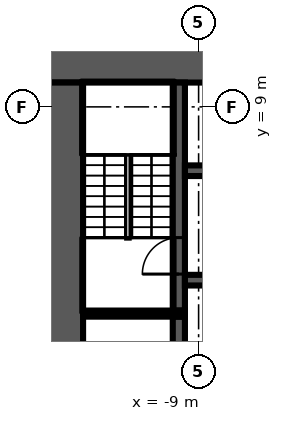
"""IFC4 building model, lengths in metres.
Left out: names, types, materials, properties, quantities, classifications, styles, units other than length and angle.
Written with IfcOpenShell. Run it as: python <this file> out.ifc"""

import sys

from ifc_helpers import new_model, si_unit, direction, frame, frame_2d, origin, place, context, subcontext, project, spatial, rectangle, extrude, element, fill, save


model = new_model("IFC4")
c1 = context("Model", 3, precision=1e-05, world=origin(), true_north=direction((0.0, 1.0)))
c2 = subcontext(c1, "Body", "Model", "MODEL_VIEW")
j1 = project(units=[si_unit("LENGTHUNIT", "METRE"), si_unit("PLANEANGLEUNIT", "RADIAN")], contexts=[c1])
p1 = place(None, origin())
s1 = spatial("IfcSite", under=j1, at=p1, CompositionType="ELEMENT")
p2 = place(p1, origin())
s2 = spatial("IfcBuilding", under=s1, at=p2, CompositionType="ELEMENT")
p3 = place(p2, frame((0.0, 0.0, 27.0)))
s3 = spatial("IfcBuildingStorey", under=s2, at=p3, CompositionType="ELEMENT", Elevation=27.0)
p4 = place(p3, frame((-14.0, 10.4, 0.0), z_axis=(0.0, 0.0, 1.0), x_axis=(1.0, 0.0, 0.0)))
e1 = element("IfcWall", 1, at=p4, inside=s3, PredefinedType="SHEAR", context=c2, shape_type="SweptSolid", body=[
    extrude(rectangle(XDim=28.0, YDim=1.2, at=frame_2d((14.0, 0.0))), origin(), (0.0, 0.0, 1.0), 5.55),
])
p5 = place(p4, frame((15.9, 0.0, 0.0)))
e2 = element("IfcOpeningElement", 2, at=p5, cuts=e1, PredefinedType="OPENING", context=c2, shape_type="SweptSolid", body=[
    extrude(rectangle(XDim=1.6, YDim=2.1, at=frame_2d((0.8, 1.05))), frame((0.0, 0.61, 0.0), z_axis=(0.0, -1.0, 0.0), x_axis=(1.0, 0.0, 0.0)), (0.0, 0.0, 1.0), 1.22),
])
p6 = place(p3, frame((-13.4, -9.8, 0.0), z_axis=(0.0, 0.0, 1.0), x_axis=(0.0, 1.0, 0.0)))
e3 = element("IfcWall", 3, at=p6, inside=s3, PredefinedType="SHEAR", context=c2, shape_type="SweptSolid", body=[
    extrude(rectangle(XDim=19.6, YDim=1.2, at=frame_2d((9.8, 0.0))), origin(), (0.0, 0.0, 1.0), 5.55),
])
p7 = place(p3, frame((-9.65, -2.1, 0.0), z_axis=(0.0, 0.0, 1.0), x_axis=(0.0, 1.0, 0.0)))
e4 = element("IfcWall", 4, at=p7, inside=s3, PredefinedType="SHEAR", context=c2, shape_type="SweptSolid", body=[
    extrude(rectangle(XDim=4.2, YDim=0.4, at=frame_2d((2.1, 0.0))), origin(), (0.0, 0.0, 1.0), 5.55),
])
p8 = place(p3, frame((-9.65, 2.3, 0.0), z_axis=(0.0, 0.0, 1.0), x_axis=(0.0, 1.0, 0.0)))
e5 = element("IfcWall", 5, at=p8, inside=s3, PredefinedType="SHEAR", context=c2, shape_type="SweptSolid", body=[
    extrude(rectangle(XDim=7.5, YDim=0.4, at=frame_2d((3.75, 0.0))), origin(), (0.0, 0.0, 1.0), 5.55),
])
p9 = place(p8, frame((1.2, 0.0, 0.0)))
e6 = element("IfcOpeningElement", 6, at=p9, cuts=e5, PredefinedType="OPENING", context=c2, shape_type="SweptSolid", body=[
    extrude(rectangle(XDim=1.2, YDim=2.1, at=frame_2d((0.6, 1.05))), frame((0.0, 0.21, 0.0), z_axis=(0.0, -1.0, 0.0), x_axis=(1.0, 0.0, 0.0)), (0.0, 0.0, 1.0), 0.42),
])
p10 = place(p3, frame((-9.45, 2.2, 0.0), z_axis=(0.0, 0.0, 1.0), x_axis=(-1.0, 0.0, 0.0)))
e7 = element("IfcWall", 7, at=p10, inside=s3, PredefinedType="SHEAR", context=c2, shape_type="SweptSolid", body=[
    extrude(rectangle(XDim=3.35, YDim=0.2, at=frame_2d((1.675, 0.0))), origin(), (0.0, 0.0, 1.0), 5.55),
])
p11 = place(p3, frame((-9.45, 6.9, 0.0), z_axis=(0.0, 0.0, 1.0), x_axis=(1.0, 0.0, 0.0)))
e8 = element("IfcWall", 8, at=p11, inside=s3, PredefinedType="SHEAR", context=c2, shape_type="SweptSolid", body=[
    extrude(rectangle(XDim=18.9, YDim=0.35, at=frame_2d((9.45, 0.0))), origin(), (0.0, 0.0, 1.0), 5.55),
])
p12 = place(p11, frame((0.8, 0.0, 0.0)))
e9 = element("IfcOpeningElement", 9, at=p12, cuts=e8, PredefinedType="OPENING", context=c2, shape_type="SweptSolid", body=[
    extrude(rectangle(XDim=1.1, YDim=2.1, at=frame_2d((0.55, 1.05))), frame((0.0, 0.185, 0.0), z_axis=(0.0, -1.0, 0.0), x_axis=(1.0, 0.0, 0.0)), (0.0, 0.0, 1.0), 0.37),
])
p13 = place(p11, frame((3.5, 0.0, 0.0)))
e10 = element("IfcOpeningElement", 10, at=p13, cuts=e8, PredefinedType="OPENING", context=c2, shape_type="SweptSolid", body=[
    extrude(rectangle(XDim=1.1, YDim=2.1, at=frame_2d((0.55, 1.05))), frame((0.0, 0.185, 0.0), z_axis=(0.0, -1.0, 0.0), x_axis=(1.0, 0.0, 0.0)), (0.0, 0.0, 1.0), 0.37),
])
p14 = place(p11, frame((6.2, 0.0, 0.0)))
e11 = element("IfcOpeningElement", 11, at=p14, cuts=e8, PredefinedType="OPENING", context=c2, shape_type="SweptSolid", body=[
    extrude(rectangle(XDim=1.1, YDim=2.1, at=frame_2d((0.55, 1.05))), frame((0.0, 0.185, 0.0), z_axis=(0.0, -1.0, 0.0), x_axis=(1.0, 0.0, 0.0)), (0.0, 0.0, 1.0), 0.37),
])
p15 = place(p11, frame((8.9, 0.0, 0.0)))
e12 = element("IfcOpeningElement", 12, at=p15, cuts=e8, PredefinedType="OPENING", context=c2, shape_type="SweptSolid", body=[
    extrude(rectangle(XDim=1.1, YDim=2.1, at=frame_2d((0.55, 1.05))), frame((0.0, 0.185, 0.0), z_axis=(0.0, -1.0, 0.0), x_axis=(1.0, 0.0, 0.0)), (0.0, 0.0, 1.0), 0.37),
])
p16 = place(p11, frame((11.55, 0.0, 0.0)))
e13 = element("IfcOpeningElement", 13, at=p16, cuts=e8, PredefinedType="OPENING", context=c2, shape_type="SweptSolid", body=[
    extrude(rectangle(XDim=1.2, YDim=2.1, at=frame_2d((0.6, 1.05))), frame((0.0, 0.185, 0.0), z_axis=(0.0, -1.0, 0.0), x_axis=(1.0, 0.0, 0.0)), (0.0, 0.0, 1.0), 0.37),
])
p17 = place(p11, frame((14.3, 0.0, 0.0)))
e14 = element("IfcOpeningElement", 14, at=p17, cuts=e8, PredefinedType="OPENING", context=c2, shape_type="SweptSolid", body=[
    extrude(rectangle(XDim=1.1, YDim=2.1, at=frame_2d((0.55, 1.05))), frame((0.0, 0.185, 0.0), z_axis=(0.0, -1.0, 0.0), x_axis=(1.0, 0.0, 0.0)), (0.0, 0.0, 1.0), 0.37),
])
p18 = place(p11, frame((17.0, 0.0, 0.0)))
e15 = element("IfcOpeningElement", 15, at=p18, cuts=e8, PredefinedType="OPENING", context=c2, shape_type="SweptSolid", body=[
    extrude(rectangle(XDim=1.1, YDim=2.1, at=frame_2d((0.55, 1.05))), frame((0.0, 0.185, 0.0), z_axis=(0.0, -1.0, 0.0), x_axis=(1.0, 0.0, 0.0)), (0.0, 0.0, 1.0), 0.37),
])
p19 = place(p3, frame((9.45, 3.3, 0.0), z_axis=(0.0, 0.0, 1.0), x_axis=(-1.0, 0.0, 0.0)))
e16 = element("IfcWall", 16, at=p19, inside=s3, PredefinedType="SHEAR", context=c2, shape_type="SweptSolid", body=[
    extrude(rectangle(XDim=18.9, YDim=0.35, at=frame_2d((9.45, 0.0))), origin(), (0.0, 0.0, 1.0), 5.55),
])
p20 = place(p19, frame((17.0, 0.0, 0.0)))
e17 = element("IfcOpeningElement", 17, at=p20, cuts=e16, PredefinedType="OPENING", context=c2, shape_type="SweptSolid", body=[
    extrude(rectangle(XDim=1.1, YDim=2.1, at=frame_2d((0.55, 1.05))), frame((0.0, 0.185, 0.0), z_axis=(0.0, -1.0, 0.0), x_axis=(1.0, 0.0, 0.0)), (0.0, 0.0, 1.0), 0.37),
])
p21 = place(p19, frame((14.3, 0.0, 0.0)))
e18 = element("IfcOpeningElement", 18, at=p21, cuts=e16, PredefinedType="OPENING", context=c2, shape_type="SweptSolid", body=[
    extrude(rectangle(XDim=1.1, YDim=2.1, at=frame_2d((0.55, 1.05))), frame((0.0, 0.185, 0.0), z_axis=(0.0, -1.0, 0.0), x_axis=(1.0, 0.0, 0.0)), (0.0, 0.0, 1.0), 0.37),
])
p22 = place(p19, frame((11.6, 0.0, 0.0)))
e19 = element("IfcOpeningElement", 19, at=p22, cuts=e16, PredefinedType="OPENING", context=c2, shape_type="SweptSolid", body=[
    extrude(rectangle(XDim=1.1, YDim=2.1, at=frame_2d((0.55, 1.05))), frame((0.0, 0.185, 0.0), z_axis=(0.0, -1.0, 0.0), x_axis=(1.0, 0.0, 0.0)), (0.0, 0.0, 1.0), 0.37),
])
p23 = place(p19, frame((8.9, 0.0, 0.0)))
e20 = element("IfcOpeningElement", 20, at=p23, cuts=e16, PredefinedType="OPENING", context=c2, shape_type="SweptSolid", body=[
    extrude(rectangle(XDim=1.1, YDim=2.1, at=frame_2d((0.55, 1.05))), frame((0.0, 0.185, 0.0), z_axis=(0.0, -1.0, 0.0), x_axis=(1.0, 0.0, 0.0)), (0.0, 0.0, 1.0), 0.37),
])
p24 = place(p19, frame((6.2, 0.0, 0.0)))
e21 = element("IfcOpeningElement", 21, at=p24, cuts=e16, PredefinedType="OPENING", context=c2, shape_type="SweptSolid", body=[
    extrude(rectangle(XDim=1.1, YDim=2.1, at=frame_2d((0.55, 1.05))), frame((0.0, 0.185, 0.0), z_axis=(0.0, -1.0, 0.0), x_axis=(1.0, 0.0, 0.0)), (0.0, 0.0, 1.0), 0.37),
])
p25 = place(p19, frame((3.5, 0.0, 0.0)))
e22 = element("IfcOpeningElement", 22, at=p25, cuts=e16, PredefinedType="OPENING", context=c2, shape_type="SweptSolid", body=[
    extrude(rectangle(XDim=1.1, YDim=2.1, at=frame_2d((0.55, 1.05))), frame((0.0, 0.185, 0.0), z_axis=(0.0, -1.0, 0.0), x_axis=(1.0, 0.0, 0.0)), (0.0, 0.0, 1.0), 0.37),
])
p26 = place(p19, frame((0.9, 0.0, 0.0)))
e23 = element("IfcOpeningElement", 23, at=p26, cuts=e16, PredefinedType="OPENING", context=c2, shape_type="SweptSolid", body=[
    extrude(rectangle(XDim=0.9, YDim=2.1, at=frame_2d((0.45, 1.05))), frame((0.0, 0.185, 0.0), z_axis=(0.0, -1.0, 0.0), x_axis=(1.0, 0.0, 0.0)), (0.0, 0.0, 1.0), 0.37),
])
p27 = place(p9, origin())
e24 = element("IfcDoor", 24, at=p27, inside=s3, OperationType="SINGLE_SWING_RIGHT", PredefinedType="DOOR", context=c2, shape_type="SweptSolid", body=[
    extrude(rectangle(XDim=1.2, YDim=2.1, at=frame_2d((0.6, 1.05))), frame((0.0, 0.025, 0.0), z_axis=(0.0, -1.0, 0.0), x_axis=(1.0, 0.0, 0.0)), (0.0, 0.0, 1.0), 0.05),
])
fill(e6, e24)
save(model, sys.argv[1])
